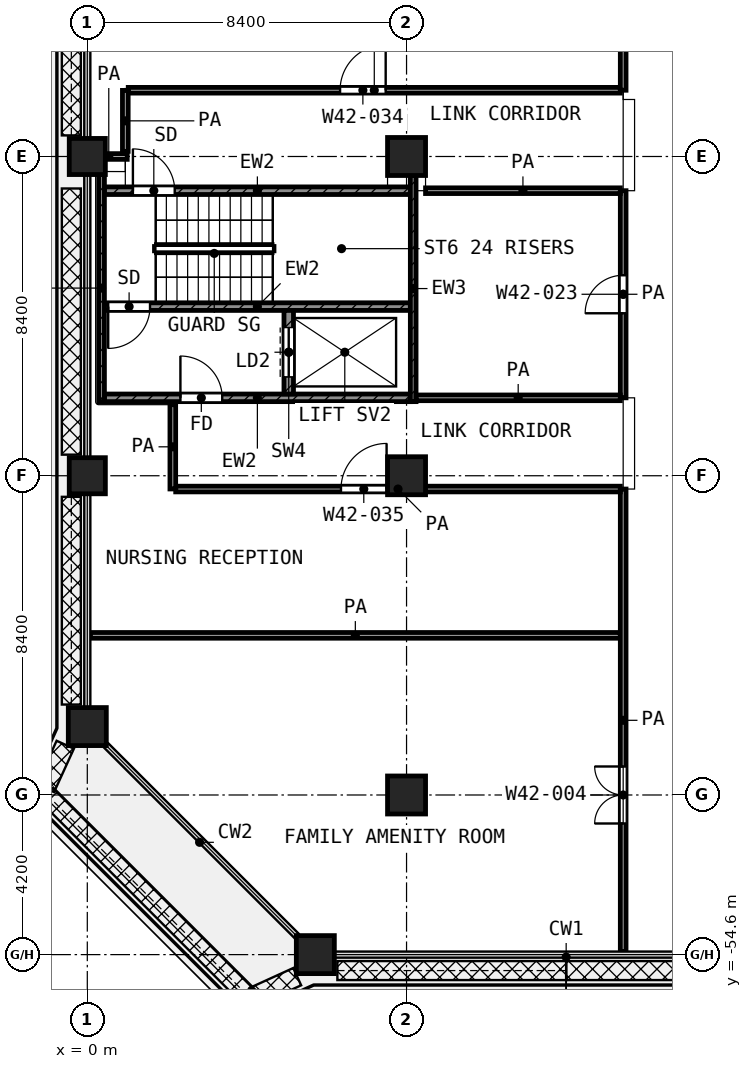
"""IFC4 building model, lengths in metres.
Left out: names, types, materials, properties, quantities, classifications, styles, units other than length and angle.
Written with IfcOpenShell. Run it as: python <this file> out.ifc"""

import sys

from ifc_helpers import new_model, si_unit, direction, frame, frame_2d, origin, origin_2d, place, context, subcontext, project, spatial, rectangle, extrude, element, fill, save


model = new_model("IFC4")
c1 = context("Model", 3, precision=1e-05, world=origin(), true_north=direction((0.0, 1.0)))
c2 = subcontext(c1, "Body", "Model", "MODEL_VIEW")
j1 = project(units=[si_unit("LENGTHUNIT", "METRE"), si_unit("PLANEANGLEUNIT", "RADIAN")], contexts=[c1])
p1 = place(None, origin())
s1 = spatial("IfcSite", under=j1, at=p1, CompositionType="ELEMENT")
p2 = place(p1, origin())
s2 = spatial("IfcBuilding", under=s1, at=p2, CompositionType="ELEMENT")
p3 = place(p2, frame((0.0, 0.0, 183.6)))
s3 = spatial("IfcBuildingStorey", under=s2, at=p3, CompositionType="ELEMENT", Elevation=183.6)
p4 = place(p3, frame((0.0, -33.6, 0.0), z_axis=(0.0, 0.0, 1.0), x_axis=(1.0, 0.0, 0.0)))
e1 = element("IfcColumn", 1, at=p4, inside=s3, PredefinedType="COLUMN", context=c2, shape_type="SweptSolid", body=[
    extrude(rectangle(XDim=0.95, YDim=0.95, at=origin_2d()), origin(), (0.0, 0.0, 1.0), 4.2),
])
p5 = place(p3, frame((8.4, -33.6, 0.0), z_axis=(0.0, 0.0, 1.0), x_axis=(1.0, 0.0, 0.0)))
e2 = element("IfcColumn", 2, at=p5, inside=s3, PredefinedType="COLUMN", context=c2, shape_type="SweptSolid", body=[
    extrude(rectangle(XDim=1.0, YDim=1.0, at=origin_2d()), origin(), (0.0, 0.0, 1.0), 4.2),
])
p6 = place(p3, frame((0.0, -42.0, 0.0), z_axis=(0.0, 0.0, 1.0), x_axis=(1.0, 0.0, 0.0)))
e3 = element("IfcColumn", 3, at=p6, inside=s3, PredefinedType="COLUMN", context=c2, shape_type="SweptSolid", body=[
    extrude(rectangle(XDim=0.95, YDim=0.95, at=origin_2d()), origin(), (0.0, 0.0, 1.0), 4.2),
])
for number, where, z_axis, x_axis in (
    (4, (8.4, -42.0, 0.0), (0.0, 0.0, 1.0), (1.0, 0.0, 0.0)),
    (5, (0.0, -48.6, 0.0), (0.0, 0.0, 1.0), (1.0, 0.0, 0.0)),
    (6, (8.4, -50.4, 0.0), (0.0, 0.0, 1.0), (1.0, 0.0, 0.0)),
    (7, (6.0, -54.6, 0.0), (0.0, 0.0, 1.0), (1.0, 0.0, 0.0)),
):
    element("IfcColumn", number, at=place(p3, frame(where, z_axis=z_axis, x_axis=x_axis)), inside=s3, PredefinedType="COLUMN", context=c2, shape_type="SweptSolid", body=[
        extrude(rectangle(XDim=1.0, YDim=1.0, at=origin_2d()), origin(), (0.0, 0.0, 1.0), 4.2),
    ])
p7 = place(p3, frame((0.375, -40.05, 0.0), z_axis=(0.0, 0.0, 1.0), x_axis=(0.0, 1.0, 0.0)))
e8 = element("IfcWall", 8, at=p7, inside=s3, PredefinedType="SHEAR", context=c2, shape_type="SweptSolid", body=[
    extrude(rectangle(XDim=5.975, YDim=0.15, at=frame_2d((2.988, 0.0))), origin(), (0.0, 0.0, 1.0), 3.6),
])
p8 = place(p3, frame((8.575, -40.05, 0.0), z_axis=(0.0, 0.0, 1.0), x_axis=(0.0, 1.0, 0.0)))
e9 = element("IfcWall", 9, at=p8, inside=s3, PredefinedType="SHEAR", context=c2, shape_type="SweptSolid", body=[
    extrude(rectangle(XDim=5.95, YDim=0.15, at=frame_2d((2.975, 0.0))), origin(), (0.0, 0.0, 1.0), 3.6),
])
p9 = place(p3, frame((0.45, -34.5, 0.0), z_axis=(0.0, 0.0, 1.0), x_axis=(1.0, 0.0, 0.0)))
e10 = element("IfcWall", 10, at=p9, inside=s3, PredefinedType="SHEAR", context=c2, shape_type="SweptSolid", body=[
    extrude(rectangle(XDim=8.05, YDim=0.2, at=frame_2d((4.025, 0.0))), origin(), (0.0, 0.0, 1.0), 3.6),
])
p10 = place(p9, frame((0.75, 0.0, 0.0)))
e11 = element("IfcOpeningElement", 11, at=p10, cuts=e10, PredefinedType="OPENING", context=c2, shape_type="SweptSolid", body=[
    extrude(rectangle(XDim=1.1, YDim=2.1, at=frame_2d((0.55, 1.05))), frame((0.0, 0.11, 0.0), z_axis=(0.0, -1.0, 0.0), x_axis=(1.0, 0.0, 0.0)), (0.0, 0.0, 1.0), 0.22),
])
p11 = place(p3, frame((0.45, -37.55, 0.0), z_axis=(0.0, 0.0, 1.0), x_axis=(1.0, 0.0, 0.0)))
e12 = element("IfcWall", 12, at=p11, inside=s3, PredefinedType="SHEAR", context=c2, shape_type="SweptSolid", body=[
    extrude(rectangle(XDim=8.05, YDim=0.2, at=frame_2d((4.025, 0.0))), origin(), (0.0, 0.0, 1.0), 3.6),
])
p12 = place(p11, frame((0.1, 0.0, 0.0)))
e13 = element("IfcOpeningElement", 13, at=p12, cuts=e12, PredefinedType="OPENING", context=c2, shape_type="SweptSolid", body=[
    extrude(rectangle(XDim=1.1, YDim=2.1, at=frame_2d((0.55, 1.05))), frame((0.0, 0.11, 0.0), z_axis=(0.0, -1.0, 0.0), x_axis=(1.0, 0.0, 0.0)), (0.0, 0.0, 1.0), 0.22),
])
p13 = place(p3, frame((0.45, -39.95, 0.0), z_axis=(0.0, 0.0, 1.0), x_axis=(1.0, 0.0, 0.0)))
e14 = element("IfcWall", 14, at=p13, inside=s3, PredefinedType="SHEAR", context=c2, shape_type="SweptSolid", body=[
    extrude(rectangle(XDim=8.05, YDim=0.2, at=frame_2d((4.025, 0.0))), origin(), (0.0, 0.0, 1.0), 3.6),
])
p14 = place(p13, frame((2.0, 0.0, 0.0)))
e15 = element("IfcOpeningElement", 15, at=p14, cuts=e14, PredefinedType="OPENING", context=c2, shape_type="SweptSolid", body=[
    extrude(rectangle(XDim=1.1, YDim=2.1, at=frame_2d((0.55, 1.05))), frame((0.0, 0.11, 0.0), z_axis=(0.0, -1.0, 0.0), x_axis=(1.0, 0.0, 0.0)), (0.0, 0.0, 1.0), 0.22),
])
p15 = place(p3, frame((5.3, -39.85, 0.0), z_axis=(0.0, 0.0, 1.0), x_axis=(0.0, 1.0, 0.0)))
e16 = element("IfcWall", 16, at=p15, inside=s3, PredefinedType="SHEAR", context=c2, shape_type="SweptSolid", body=[
    extrude(rectangle(XDim=2.2, YDim=0.25, at=frame_2d((1.1, 0.0))), origin(), (0.0, 0.0, 1.0), 3.6),
])
p16 = place(p15, frame((0.45, 0.0, 0.0)))
e17 = element("IfcOpeningElement", 17, at=p16, cuts=e16, PredefinedType="OPENING", context=c2, shape_type="SweptSolid", body=[
    extrude(rectangle(XDim=1.3, YDim=2.1, at=frame_2d((0.65, 1.05))), frame((0.0, 0.135, 0.0), z_axis=(0.0, -1.0, 0.0), x_axis=(1.0, 0.0, 0.0)), (0.0, 0.0, 1.0), 0.27),
])
p17 = place(p3, frame((0.08, -46.2, 0.0), z_axis=(0.0, 0.0, 1.0), x_axis=(1.0, 0.0, 0.0)))
e18 = element("IfcWall", 18, at=p17, inside=s3, PredefinedType="PARTITIONING", context=c2, shape_type="SweptSolid", body=[
    extrude(rectangle(XDim=13.945, YDim=0.15, at=frame_2d((6.972, 0.0))), origin(), (0.0, 0.0, 1.0), 3.6),
])
p18 = place(p3, frame((2.326, -42.35, 0.0), z_axis=(0.0, 0.0, 1.0), x_axis=(1.0, 0.0, 0.0)))
e19 = element("IfcWall", 19, at=p18, inside=s3, PredefinedType="PARTITIONING", context=c2, shape_type="SweptSolid", body=[
    extrude(rectangle(XDim=11.699, YDim=0.15, at=frame_2d((5.85, 0.0))), origin(), (0.0, 0.0, 1.0), 3.6),
])
p19 = place(p18, frame((4.349, 0.0, 0.0)))
e20 = element("IfcOpeningElement", 20, at=p19, cuts=e19, PredefinedType="OPENING", context=c2, shape_type="SweptSolid", body=[
    extrude(rectangle(XDim=1.2, YDim=2.1, at=frame_2d((0.6, 1.05))), frame((0.0, 0.085, 0.0), z_axis=(0.0, -1.0, 0.0), x_axis=(1.0, 0.0, 0.0)), (0.0, 0.0, 1.0), 0.17),
])
p20 = place(p3, frame((8.65, -39.95, 0.0), z_axis=(0.0, 0.0, 1.0), x_axis=(1.0, 0.0, 0.0)))
e21 = element("IfcWall", 21, at=p20, inside=s3, PredefinedType="PARTITIONING", context=c2, shape_type="SweptSolid", body=[
    extrude(rectangle(XDim=5.375, YDim=0.15, at=frame_2d((2.688, 0.0))), origin(), (0.0, 0.0, 1.0), 3.6),
])
p21 = place(p3, frame((8.9, -34.5, 0.0), z_axis=(0.0, 0.0, 1.0), x_axis=(1.0, 0.0, 0.0)))
e22 = element("IfcWall", 22, at=p21, inside=s3, PredefinedType="PARTITIONING", context=c2, shape_type="SweptSolid", body=[
    extrude(rectangle(XDim=5.125, YDim=0.15, at=frame_2d((2.562, 0.0))), origin(), (0.0, 0.0, 1.0), 3.6),
])
p22 = place(p3, frame((0.08, -33.6, 0.0), z_axis=(0.0, 0.0, 1.0), x_axis=(1.0, 0.0, 0.0)))
e23 = element("IfcWall", 23, at=p22, inside=s3, PredefinedType="PARTITIONING", context=c2, shape_type="SweptSolid", body=[
    extrude(rectangle(XDim=0.97, YDim=0.15, at=frame_2d((0.485, 0.0))), origin(), (0.0, 0.0, 1.0), 3.6),
])
p23 = place(p3, frame((1.077, -31.857, 0.0), z_axis=(0.0, 0.0, 1.0), x_axis=(1.0, 0.0, 0.0)))
e24 = element("IfcWall", 24, at=p23, inside=s3, PredefinedType="PARTITIONING", context=c2, shape_type="SweptSolid", body=[
    extrude(rectangle(XDim=12.948, YDim=0.15, at=frame_2d((6.474, 0.0))), origin(), (0.0, 0.0, 1.0), 3.6),
])
p24 = place(p23, frame((5.574, 0.0, 0.0)))
e25 = element("IfcOpeningElement", 25, at=p24, cuts=e24, PredefinedType="OPENING", context=c2, shape_type="SweptSolid", body=[
    extrude(rectangle(XDim=1.2, YDim=2.1, at=frame_2d((0.6, 1.05))), frame((0.0, 0.085, 0.0), z_axis=(0.0, -1.0, 0.0), x_axis=(1.0, 0.0, 0.0)), (0.0, 0.0, 1.0), 0.17),
])
p25 = place(p3, frame((1.0, -33.465, 0.0), z_axis=(0.0, 0.0, 1.0), x_axis=(0.0, 1.0, 0.0)))
e26 = element("IfcWall", 26, at=p25, inside=s3, PredefinedType="PARTITIONING", context=c2, shape_type="SweptSolid", body=[
    extrude(rectangle(XDim=1.606, YDim=0.15, at=frame_2d((0.803, 0.0))), origin(), (0.0, 0.0, 1.0), 3.6),
])
p26 = place(p3, frame((2.25, -42.348, 0.0), z_axis=(0.0, 0.0, 1.0), x_axis=(0.0, 1.0, 0.0)))
e27 = element("IfcWall", 27, at=p26, inside=s3, PredefinedType="PARTITIONING", context=c2, shape_type="SweptSolid", body=[
    extrude(rectangle(XDim=2.218, YDim=0.15, at=frame_2d((1.109, 0.0))), origin(), (0.0, 0.0, 1.0), 3.6),
])
p27 = place(p3, frame((14.1, -54.52, 0.0), z_axis=(0.0, 0.0, 1.0), x_axis=(0.0, 1.0, 0.0)))
e28 = element("IfcWall", 28, at=p27, inside=s3, PredefinedType="PARTITIONING", context=c2, shape_type="SweptSolid", body=[
    extrude(rectangle(XDim=12.17, YDim=0.15, at=frame_2d((6.085, 0.0))), origin(), (0.0, 0.0, 1.0), 3.6),
])
p28 = place(p27, frame((3.37, 0.0, 0.0)))
e29 = element("IfcOpeningElement", 29, at=p28, cuts=e28, PredefinedType="OPENING", context=c2, shape_type="SweptSolid", body=[
    extrude(rectangle(XDim=1.5, YDim=2.1, at=frame_2d((0.75, 1.05))), frame((0.0, 0.085, 0.0), z_axis=(0.0, -1.0, 0.0), x_axis=(1.0, 0.0, 0.0)), (0.0, 0.0, 1.0), 0.17),
])
p29 = place(p3, frame((14.1, -39.95, 0.0), z_axis=(0.0, 0.0, 1.0), x_axis=(0.0, 1.0, 0.0)))
e30 = element("IfcWall", 30, at=p29, inside=s3, PredefinedType="PARTITIONING", context=c2, shape_type="SweptSolid", body=[
    extrude(rectangle(XDim=5.45, YDim=0.15, at=frame_2d((2.725, 0.0))), origin(), (0.0, 0.0, 1.0), 3.6),
])
p30 = place(p29, frame((2.225, 0.0, 0.0)))
e31 = element("IfcOpeningElement", 31, at=p30, cuts=e30, PredefinedType="OPENING", context=c2, shape_type="SweptSolid", body=[
    extrude(rectangle(XDim=1.0, YDim=2.1, at=frame_2d((0.5, 1.05))), frame((0.0, 0.085, 0.0), z_axis=(0.0, -1.0, 0.0), x_axis=(1.0, 0.0, 0.0)), (0.0, 0.0, 1.0), 0.17),
])
p31 = place(p3, frame((14.1, -31.857, 0.0), z_axis=(0.0, 0.0, 1.0), x_axis=(0.0, 1.0, 0.0)))
e32 = element("IfcWall", 32, at=p31, inside=s3, PredefinedType="PARTITIONING", context=c2, shape_type="SweptSolid", body=[
    extrude(rectangle(XDim=2.457, YDim=0.15, at=frame_2d((1.229, 0.0))), origin(), (0.0, 0.0, 1.0), 3.6),
])
p32 = place(p10, origin())
e33 = element("IfcDoor", 33, at=p32, inside=s3, OperationType="SINGLE_SWING_LEFT", PredefinedType="DOOR", context=c2, shape_type="SweptSolid", body=[
    extrude(rectangle(XDim=1.1, YDim=2.1, at=frame_2d((0.55, 1.05))), frame((0.0, 0.025, 0.0), z_axis=(0.0, -1.0, 0.0), x_axis=(1.0, 0.0, 0.0)), (0.0, 0.0, 1.0), 0.05),
])
fill(e11, e33)
p33 = place(p12, frame((1.1, 0.0, 0.0), z_axis=(0.0, 0.0, 1.0), x_axis=(-1.0, 0.0, 0.0)))
e34 = element("IfcDoor", 34, at=p33, inside=s3, OperationType="SINGLE_SWING_LEFT", PredefinedType="DOOR", context=c2, shape_type="SweptSolid", body=[
    extrude(rectangle(XDim=1.1, YDim=2.1, at=frame_2d((0.55, 1.05))), frame((0.0, 0.025, 0.0), z_axis=(0.0, -1.0, 0.0), x_axis=(1.0, 0.0, 0.0)), (0.0, 0.0, 1.0), 0.05),
])
fill(e13, e34)
p34 = place(p16, origin())
e35 = element("IfcDoor", 35, at=p34, inside=s3, OperationType="DOUBLE_DOOR_SLIDING", PredefinedType="DOOR", context=c2, shape_type="SweptSolid", body=[
    extrude(rectangle(XDim=1.3, YDim=2.1, at=frame_2d((0.65, 1.05))), frame((0.0, 0.025, 0.0), z_axis=(0.0, -1.0, 0.0), x_axis=(1.0, 0.0, 0.0)), (0.0, 0.0, 1.0), 0.05),
])
fill(e17, e35)
p35 = place(p14, origin())
e36 = element("IfcDoor", 36, at=p35, inside=s3, OperationType="SINGLE_SWING_LEFT", PredefinedType="DOOR", context=c2, shape_type="SweptSolid", body=[
    extrude(rectangle(XDim=1.1, YDim=2.1, at=frame_2d((0.55, 1.05))), frame((0.0, 0.025, 0.0), z_axis=(0.0, -1.0, 0.0), x_axis=(1.0, 0.0, 0.0)), (0.0, 0.0, 1.0), 0.05),
])
fill(e15, e36)
p36 = place(p24, origin())
e37 = element("IfcDoor", 37, at=p36, inside=s3, OperationType="SINGLE_SWING_RIGHT", PredefinedType="DOOR", context=c2, shape_type="SweptSolid", body=[
    extrude(rectangle(XDim=1.2, YDim=2.1, at=frame_2d((0.6, 1.05))), frame((0.0, 0.025, 0.0), z_axis=(0.0, -1.0, 0.0), x_axis=(1.0, 0.0, 0.0)), (0.0, 0.0, 1.0), 0.05),
])
fill(e25, e37)
p37 = place(p30, origin())
e38 = element("IfcDoor", 38, at=p37, inside=s3, OperationType="SINGLE_SWING_LEFT", PredefinedType="DOOR", context=c2, shape_type="SweptSolid", body=[
    extrude(rectangle(XDim=1.0, YDim=2.1, at=frame_2d((0.5, 1.05))), frame((0.0, 0.025, 0.0), z_axis=(0.0, -1.0, 0.0), x_axis=(1.0, 0.0, 0.0)), (0.0, 0.0, 1.0), 0.05),
])
fill(e31, e38)
p38 = place(p19, origin())
e39 = element("IfcDoor", 39, at=p38, inside=s3, OperationType="SINGLE_SWING_RIGHT", PredefinedType="DOOR", context=c2, shape_type="SweptSolid", body=[
    extrude(rectangle(XDim=1.2, YDim=2.1, at=frame_2d((0.6, 1.05))), frame((0.0, 0.025, 0.0), z_axis=(0.0, -1.0, 0.0), x_axis=(1.0, 0.0, 0.0)), (0.0, 0.0, 1.0), 0.05),
])
fill(e20, e39)
p39 = place(p28, origin())
e40 = element("IfcDoor", 40, at=p39, inside=s3, OperationType="DOUBLE_DOOR_SINGLE_SWING", PredefinedType="DOOR", context=c2, shape_type="SweptSolid", body=[
    extrude(rectangle(XDim=1.5, YDim=2.1, at=frame_2d((0.75, 1.05))), frame((0.0, 0.025, 0.0), z_axis=(0.0, -1.0, 0.0), x_axis=(1.0, 0.0, 0.0)), (0.0, 0.0, 1.0), 0.05),
])
fill(e29, e40)
save(model, sys.argv[1])
